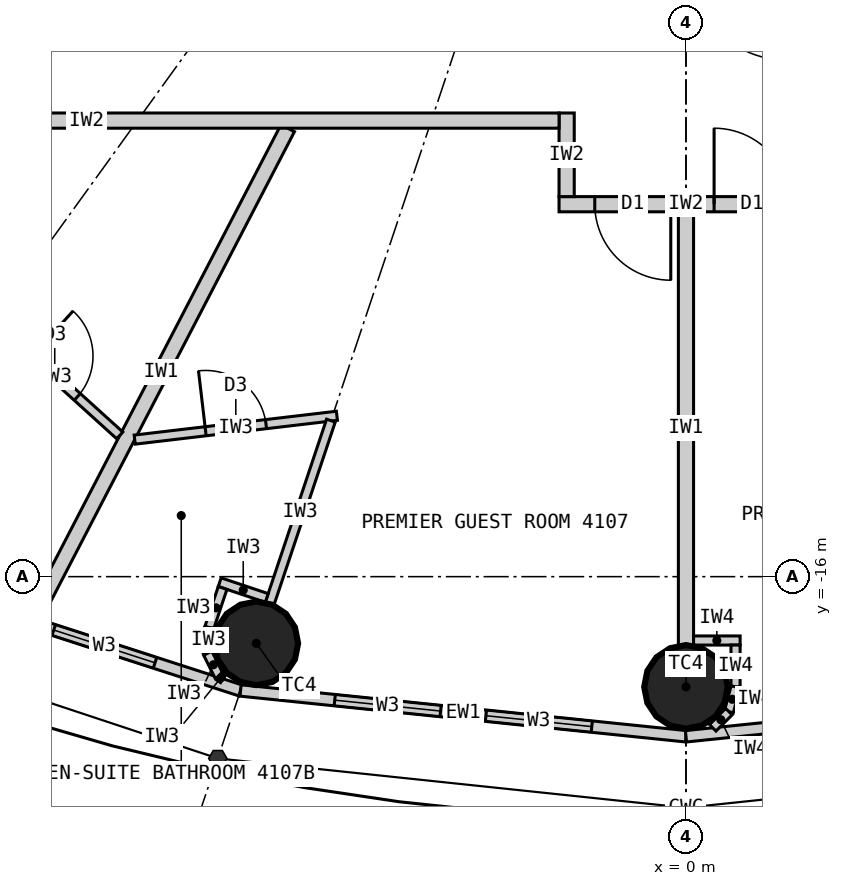
"""IFC4 building model, lengths in metres.
Left out: names, types, materials, properties, quantities, classifications, styles, units other than length and angle.
Written with IfcOpenShell. Run it as: python <this file> out.ifc"""

import sys

from ifc_helpers import new_model, si_unit, direction, frame, frame_2d, origin, origin_2d, place, context, subcontext, project, spatial, rectangle, circle, extrude, element, fill, save


model = new_model("IFC4")
c1 = context("Model", 3, precision=1e-05, world=origin(), true_north=direction((0.0, 1.0)))
c2 = subcontext(c1, "Body", "Model", "MODEL_VIEW")
j1 = project(units=[si_unit("LENGTHUNIT", "METRE"), si_unit("PLANEANGLEUNIT", "RADIAN")], contexts=[c1])
p1 = place(None, origin())
s1 = spatial("IfcSite", under=j1, at=p1, CompositionType="ELEMENT")
p2 = place(p1, origin())
s2 = spatial("IfcBuilding", under=s1, at=p2, CompositionType="ELEMENT")
p3 = place(p2, frame((0.0, 0.0, 156.6)))
s3 = spatial("IfcBuildingStorey", under=s2, at=p3, CompositionType="ELEMENT", Elevation=156.6)
for number, where, z_axis, x_axis in (
    (1, (-5.653, -16.877, 0.0), (0.0, 0.0, 1.0), (1.0, 0.0, 0.0)),
    (2, (0.0, -17.45, 0.0), (0.0, 0.0, 1.0), (1.0, 0.0, 0.0)),
):
    element("IfcColumn", number, at=place(p3, frame(where, z_axis=z_axis, x_axis=x_axis)), inside=s3, PredefinedType="COLUMN", context=c2, shape_type="SweptSolid", body=[
        extrude(circle(Radius=0.55, at=origin_2d()), origin(), (0.0, 0.0, 1.0), 3.3),
    ])
p4 = place(p3, frame((-11.346, -15.722, 0.0), z_axis=(0.0, 0.0, 1.0), x_axis=(0.951432482129, -0.307857486429, 0.0)))
e3 = element("IfcWall", 3, at=p4, inside=s3, PredefinedType="ELEMENTEDWALL", context=c2, shape_type="SweptSolid", body=[
    extrude(rectangle(XDim=5.766, YDim=0.15, at=frame_2d((2.883, 0.0))), origin(), (0.0, 0.0, 1.0), 3.12),
])
p5 = place(p4, frame((1.183, 0.0, 0.9)))
e4 = element("IfcOpeningElement", 4, at=p5, cuts=e3, PredefinedType="OPENING", context=c2, shape_type="SweptSolid", body=[
    extrude(rectangle(XDim=1.4, YDim=1.9, at=frame_2d((0.7, 0.95))), frame((0.0, 0.085, 0.0), z_axis=(0.0, -1.0, 0.0), x_axis=(1.0, 0.0, 0.0)), (0.0, 0.0, 1.0), 0.17),
])
p6 = place(p4, frame((3.183, 0.0, 0.9)))
e5 = element("IfcOpeningElement", 5, at=p6, cuts=e3, PredefinedType="OPENING", context=c2, shape_type="SweptSolid", body=[
    extrude(rectangle(XDim=1.4, YDim=1.9, at=frame_2d((0.7, 0.95))), frame((0.0, 0.085, 0.0), z_axis=(0.0, -1.0, 0.0), x_axis=(1.0, 0.0, 0.0)), (0.0, 0.0, 1.0), 0.17),
])
p7 = place(p3, frame((-5.86, -17.497, 0.0), z_axis=(0.0, 0.0, 1.0), x_axis=(0.994751738032, -0.102318032045, 0.0)))
e6 = element("IfcWall", 6, at=p7, inside=s3, PredefinedType="ELEMENTEDWALL", context=c2, shape_type="SweptSolid", body=[
    extrude(rectangle(XDim=5.891, YDim=0.15, at=frame_2d((2.946, 0.0))), origin(), (0.0, 0.0, 1.0), 3.12),
])
p8 = place(p7, frame((1.246, 0.0, 0.9)))
e7 = element("IfcOpeningElement", 7, at=p8, cuts=e6, PredefinedType="OPENING", context=c2, shape_type="SweptSolid", body=[
    extrude(rectangle(XDim=1.4, YDim=1.9, at=frame_2d((0.7, 0.95))), frame((0.0, 0.085, 0.0), z_axis=(0.0, -1.0, 0.0), x_axis=(1.0, 0.0, 0.0)), (0.0, 0.0, 1.0), 0.17),
])
p9 = place(p7, frame((3.246, 0.0, 0.9)))
e8 = element("IfcOpeningElement", 8, at=p9, cuts=e6, PredefinedType="OPENING", context=c2, shape_type="SweptSolid", body=[
    extrude(rectangle(XDim=1.4, YDim=1.9, at=frame_2d((0.7, 0.95))), frame((0.0, 0.085, 0.0), z_axis=(0.0, -1.0, 0.0), x_axis=(1.0, 0.0, 0.0)), (0.0, 0.0, 1.0), 0.17),
])
p10 = place(p3, frame((0.0, -18.1, 0.0), z_axis=(0.0, 0.0, 1.0), x_axis=(0.994751738032, 0.102318032045, 0.0)))
e9 = element("IfcWall", 9, at=p10, inside=s3, PredefinedType="ELEMENTEDWALL", context=c2, shape_type="SweptSolid", body=[
    extrude(rectangle(XDim=5.891, YDim=0.15, at=frame_2d((2.946, 0.0))), origin(), (0.0, 0.0, 1.0), 3.12),
])
p11 = place(p10, frame((1.246, 0.0, 0.9)))
e10 = element("IfcOpeningElement", 10, at=p11, cuts=e9, PredefinedType="OPENING", context=c2, shape_type="SweptSolid", body=[
    extrude(rectangle(XDim=1.4, YDim=1.9, at=frame_2d((0.7, 0.95))), frame((0.0, 0.085, 0.0), z_axis=(0.0, -1.0, 0.0), x_axis=(1.0, 0.0, 0.0)), (0.0, 0.0, 1.0), 0.17),
])
p12 = place(p10, frame((3.246, 0.0, 0.9)))
e11 = element("IfcOpeningElement", 11, at=p12, cuts=e9, PredefinedType="OPENING", context=c2, shape_type="SweptSolid", body=[
    extrude(rectangle(XDim=1.4, YDim=1.9, at=frame_2d((0.7, 0.95))), frame((0.0, 0.085, 0.0), z_axis=(0.0, -1.0, 0.0), x_axis=(1.0, 0.0, 0.0)), (0.0, 0.0, 1.0), 0.17),
])
p13 = place(p3, frame((-5.24, -10.1, 0.0), z_axis=(0.0, 0.0, 1.0), x_axis=(-0.460532965373, -0.887642601391, 0.0)))
e12 = element("IfcWall", 12, at=p13, inside=s3, PredefinedType="PARTITIONING", context=c2, shape_type="SweptSolid", body=[
    extrude(rectangle(XDim=7.231, YDim=0.2, at=frame_2d((3.616, 0.0))), origin(), (0.0, 0.0, 1.0), 3.12),
])
p14 = place(p3, frame((0.0, -11.2, 0.0), z_axis=(0.0, 0.0, 1.0), x_axis=(0.0, -1.0, 0.0)))
e13 = element("IfcWall", 13, at=p14, inside=s3, PredefinedType="PARTITIONING", context=c2, shape_type="SweptSolid", body=[
    extrude(rectangle(XDim=5.7, YDim=0.2, at=frame_2d((2.85, 0.0))), origin(), (0.0, 0.0, 1.0), 2.42),
])
p15 = place(p3, frame((1.67, -11.1, 0.0), z_axis=(0.0, 0.0, 1.0), x_axis=(-1.0, 0.0, 0.0)))
e14 = element("IfcWall", 14, at=p15, inside=s3, PredefinedType="PARTITIONING", context=c2, shape_type="SweptSolid", body=[
    extrude(rectangle(XDim=3.34, YDim=0.2, at=frame_2d((1.67, 0.0))), origin(), (0.0, 0.0, 1.0), 3.12),
])
p16 = place(p15, frame((1.87, 0.0, 0.0)))
e15 = element("IfcOpeningElement", 15, at=p16, cuts=e14, PredefinedType="OPENING", context=c2, shape_type="SweptSolid", body=[
    extrude(rectangle(XDim=1.0, YDim=2.2, at=frame_2d((0.5, 1.1))), frame((0.0, 0.11, 0.0), z_axis=(0.0, -1.0, 0.0), x_axis=(1.0, 0.0, 0.0)), (0.0, 0.0, 1.0), 0.22),
])
p17 = place(p15, frame((0.3, 0.0, 0.0)))
e16 = element("IfcOpeningElement", 16, at=p17, cuts=e14, PredefinedType="OPENING", context=c2, shape_type="SweptSolid", body=[
    extrude(rectangle(XDim=1.0, YDim=2.2, at=frame_2d((0.5, 1.1))), frame((0.0, 0.11, 0.0), z_axis=(0.0, -1.0, 0.0), x_axis=(1.0, 0.0, 0.0)), (0.0, 0.0, 1.0), 0.22),
])
p18 = place(p3, frame((-1.57, -9.9, 0.0), z_axis=(0.0, 0.0, 1.0), x_axis=(0.0, -1.0, 0.0)))
e17 = element("IfcWall", 17, at=p18, inside=s3, PredefinedType="PARTITIONING", context=c2, shape_type="SweptSolid", body=[
    extrude(rectangle(XDim=1.1, YDim=0.2, at=frame_2d((0.55, 0.0))), origin(), (0.0, 0.0, 1.0), 3.12),
])
p19 = place(p3, frame((-7.45, -14.142, 0.0), z_axis=(0.0, 0.0, 1.0), x_axis=(-0.74113984586, 0.671350675041, 0.0)))
e18 = element("IfcWall", 18, at=p19, inside=s3, PredefinedType="PARTITIONING", context=c2, shape_type="SweptSolid", body=[
    extrude(rectangle(XDim=2.309, YDim=0.12, at=frame_2d((1.154, 0.0))), origin(), (0.0, 0.0, 1.0), 3.12),
])
p20 = place(p19, frame((0.754, 0.0, 0.0)))
e19 = element("IfcOpeningElement", 19, at=p20, cuts=e18, PredefinedType="OPENING", context=c2, shape_type="SweptSolid", body=[
    extrude(rectangle(XDim=0.8, YDim=2.1, at=frame_2d((0.4, 1.05))), frame((0.0, 0.07, 0.0), z_axis=(0.0, -1.0, 0.0), x_axis=(1.0, 0.0, 0.0)), (0.0, 0.0, 1.0), 0.14),
])
p21 = place(p3, frame((-7.253, -14.197, 0.0), z_axis=(0.0, 0.0, 1.0), x_axis=(0.993128188393, 0.117031625725, 0.0)))
e20 = element("IfcWall", 20, at=p21, inside=s3, PredefinedType="PARTITIONING", context=c2, shape_type="SweptSolid", body=[
    extrude(rectangle(XDim=2.678, YDim=0.12, at=frame_2d((1.339, 0.0))), origin(), (0.0, 0.0, 1.0), 3.12),
])
p22 = place(p21, frame((0.939, 0.0, 0.0)))
e21 = element("IfcOpeningElement", 21, at=p22, cuts=e20, PredefinedType="OPENING", context=c2, shape_type="SweptSolid", body=[
    extrude(rectangle(XDim=0.8, YDim=2.1, at=frame_2d((0.4, 1.05))), frame((0.0, 0.07, 0.0), z_axis=(0.0, -1.0, 0.0), x_axis=(1.0, 0.0, 0.0)), (0.0, 0.0, 1.0), 0.14),
])
p23 = place(p3, frame((-4.671, -13.948, 0.0), z_axis=(0.0, 0.0, 1.0), x_axis=(-0.317669167093, -0.948201613729, 0.0)))
e22 = element("IfcWall", 22, at=p23, inside=s3, PredefinedType="PARTITIONING", context=c2, shape_type="SweptSolid", body=[
    extrude(rectangle(XDim=2.54, YDim=0.12, at=frame_2d((1.27, 0.0))), origin(), (0.0, 0.0, 1.0), 2.42),
])
p24 = place(p3, frame((-5.516, -16.28, 0.0), z_axis=(0.0, 0.0, 1.0), x_axis=(-0.948157944392, 0.317799484717, 0.0)))
e23 = element("IfcWall", 23, at=p24, inside=s3, PredefinedType="PARTITIONING", context=c2, shape_type="SweptSolid", body=[
    extrude(rectangle(XDim=0.652, YDim=0.12, at=frame_2d((0.326, 0.0))), origin(), (0.0, 0.0, 1.0), 3.12),
])
p25 = place(p3, frame((-6.097, -16.149, 0.0), z_axis=(0.0, 0.0, 1.0), x_axis=(-0.317292604854, -0.948327687514, 0.0)))
e24 = element("IfcWall", 24, at=p25, inside=s3, PredefinedType="PARTITIONING", context=c2, shape_type="SweptSolid", body=[
    extrude(rectangle(XDim=0.55, YDim=0.12, at=frame_2d((0.275, 0.0))), origin(), (0.0, 0.0, 1.0), 3.12),
])
for number, where, z_axis, x_axis in (
    (25, (-6.271, -16.67, 0.0), (0.0, 0.0, 1.0), (-0.061, -0.998, 0.0)),
    (26, (-6.292, -17.007, 0.0), (0.0, 0.0, 1.0), (0.445, -0.895, 0.0)),
):
    element("IfcWall", number, at=place(p3, frame(where, z_axis=z_axis, x_axis=x_axis)), inside=s3, PredefinedType="PARTITIONING", context=c2, shape_type="SweptSolid", body=[
        extrude(rectangle(XDim=0.338, YDim=0.12, at=frame_2d((0.169, 0.0))), origin(), (0.0, 0.0, 1.0), 3.12),
    ])
p26 = place(p3, frame((-6.142, -17.31, 0.0), z_axis=(0.0, 0.0, 1.0), x_axis=(0.835039693181, -0.550189704386, 0.0)))
e27 = element("IfcWall", 27, at=p26, inside=s3, PredefinedType="PARTITIONING", context=c2, shape_type="SweptSolid", body=[
    extrude(rectangle(XDim=0.062, YDim=0.12, at=frame_2d((0.031, 0.0))), origin(), (0.0, 0.0, 1.0), 3.12),
])
p27 = place(p3, frame((-1.67, -10.0, 0.0), z_axis=(0.0, 0.0, 1.0), x_axis=(-1.0, 0.0, 0.0)))
e28 = element("IfcWall", 28, at=p27, inside=s3, PredefinedType="PARTITIONING", context=c2, shape_type="SweptSolid", body=[
    extrude(rectangle(XDim=12.43, YDim=0.2, at=frame_2d((6.215, 0.0))), origin(), (0.0, 0.0, 1.0), 3.12),
])
p28 = place(p27, frame((9.655, 0.0, 0.0)))
e29 = element("IfcOpeningElement", 29, at=p28, cuts=e28, PredefinedType="OPENING", context=c2, shape_type="SweptSolid", body=[
    extrude(rectangle(XDim=1.0, YDim=2.2, at=frame_2d((0.5, 1.1))), frame((0.0, 0.11, 0.0), z_axis=(0.0, -1.0, 0.0), x_axis=(1.0, 0.0, 0.0)), (0.0, 0.0, 1.0), 0.22),
])
p29 = place(p3, frame((0.1, -16.84, 0.0), z_axis=(0.0, 0.0, 1.0), x_axis=(1.0, 0.0, 0.0)))
e30 = element("IfcWall", 30, at=p29, inside=s3, PredefinedType="PARTITIONING", context=c2, shape_type="SweptSolid", body=[
    extrude(rectangle(XDim=0.612, YDim=0.12, at=frame_2d((0.306, 0.0))), origin(), (0.0, 0.0, 1.0), 3.12),
])
p30 = place(p3, frame((0.652, -16.9, 0.0), z_axis=(0.0, 0.0, 1.0), x_axis=(0.0, -1.0, 0.0)))
e31 = element("IfcWall", 31, at=p30, inside=s3, PredefinedType="PARTITIONING", context=c2, shape_type="SweptSolid", body=[
    extrude(rectangle(XDim=0.55, YDim=0.12, at=frame_2d((0.275, 0.0))), origin(), (0.0, 0.0, 1.0), 3.12),
])
p31 = place(p3, frame((0.652, -17.45, 0.0), z_axis=(0.0, 0.0, 1.0), x_axis=(-0.258832454679, -0.965922233104, 0.0)))
e32 = element("IfcWall", 32, at=p31, inside=s3, PredefinedType="PARTITIONING", context=c2, shape_type="SweptSolid", body=[
    extrude(rectangle(XDim=0.338, YDim=0.12, at=frame_2d((0.169, 0.0))), origin(), (0.0, 0.0, 1.0), 3.12),
])
p32 = place(p3, frame((0.565, -17.776, 0.0), z_axis=(0.0, 0.0, 1.0), x_axis=(-0.707106781187, -0.707106781187, 0.0)))
e33 = element("IfcWall", 33, at=p32, inside=s3, PredefinedType="PARTITIONING", context=c2, shape_type="SweptSolid", body=[
    extrude(rectangle(XDim=0.301, YDim=0.12, at=frame_2d((0.15, 0.0))), origin(), (0.0, 0.0, 1.0), 3.12),
])
p33 = place(p6, origin())
e34 = element("IfcWindow", 34, at=p33, inside=s3, PartitioningType="SINGLE_PANEL", PredefinedType="WINDOW", context=c2, shape_type="SweptSolid", body=[
    extrude(rectangle(XDim=1.4, YDim=1.9, at=frame_2d((0.7, 0.95))), frame((0.0, 0.03, 0.0), z_axis=(0.0, -1.0, 0.0), x_axis=(1.0, 0.0, 0.0)), (0.0, 0.0, 1.0), 0.06),
])
fill(e5, e34)
p34 = place(p8, origin())
e35 = element("IfcWindow", 35, at=p34, inside=s3, PartitioningType="SINGLE_PANEL", PredefinedType="WINDOW", context=c2, shape_type="SweptSolid", body=[
    extrude(rectangle(XDim=1.4, YDim=1.9, at=frame_2d((0.7, 0.95))), frame((0.0, 0.03, 0.0), z_axis=(0.0, -1.0, 0.0), x_axis=(1.0, 0.0, 0.0)), (0.0, 0.0, 1.0), 0.06),
])
fill(e7, e35)
p35 = place(p9, origin())
e36 = element("IfcWindow", 36, at=p35, inside=s3, PartitioningType="SINGLE_PANEL", PredefinedType="WINDOW", context=c2, shape_type="SweptSolid", body=[
    extrude(rectangle(XDim=1.4, YDim=1.9, at=frame_2d((0.7, 0.95))), frame((0.0, 0.03, 0.0), z_axis=(0.0, -1.0, 0.0), x_axis=(1.0, 0.0, 0.0)), (0.0, 0.0, 1.0), 0.06),
])
fill(e8, e36)
p36 = place(p20, origin())
e37 = element("IfcDoor", 37, at=p36, inside=s3, OperationType="SINGLE_SWING_RIGHT", PredefinedType="DOOR", context=c2, shape_type="SweptSolid", body=[
    extrude(rectangle(XDim=0.8, YDim=2.1, at=frame_2d((0.4, 1.05))), frame((0.0, 0.025, 0.0), z_axis=(0.0, -1.0, 0.0), x_axis=(1.0, 0.0, 0.0)), (0.0, 0.0, 1.0), 0.05),
])
fill(e19, e37)
p37 = place(p22, origin())
e38 = element("IfcDoor", 38, at=p37, inside=s3, OperationType="SINGLE_SWING_LEFT", PredefinedType="DOOR", context=c2, shape_type="SweptSolid", body=[
    extrude(rectangle(XDim=0.8, YDim=2.1, at=frame_2d((0.4, 1.05))), frame((0.0, 0.025, 0.0), z_axis=(0.0, -1.0, 0.0), x_axis=(1.0, 0.0, 0.0)), (0.0, 0.0, 1.0), 0.05),
])
fill(e21, e38)
p38 = place(p16, origin())
e39 = element("IfcDoor", 39, at=p38, inside=s3, OperationType="SINGLE_SWING_LEFT", PredefinedType="DOOR", context=c2, shape_type="SweptSolid", body=[
    extrude(rectangle(XDim=1.0, YDim=2.2, at=frame_2d((0.5, 1.1))), frame((0.0, 0.025, 0.0), z_axis=(0.0, -1.0, 0.0), x_axis=(1.0, 0.0, 0.0)), (0.0, 0.0, 1.0), 0.05),
])
fill(e15, e39)
p39 = place(p17, origin())
e40 = element("IfcDoor", 40, at=p39, inside=s3, OperationType="SINGLE_SWING_RIGHT", PredefinedType="DOOR", context=c2, shape_type="SweptSolid", body=[
    extrude(rectangle(XDim=1.0, YDim=2.2, at=frame_2d((0.5, 1.1))), frame((0.0, 0.025, 0.0), z_axis=(0.0, -1.0, 0.0), x_axis=(1.0, 0.0, 0.0)), (0.0, 0.0, 1.0), 0.05),
])
fill(e16, e40)
save(model, sys.argv[1])
